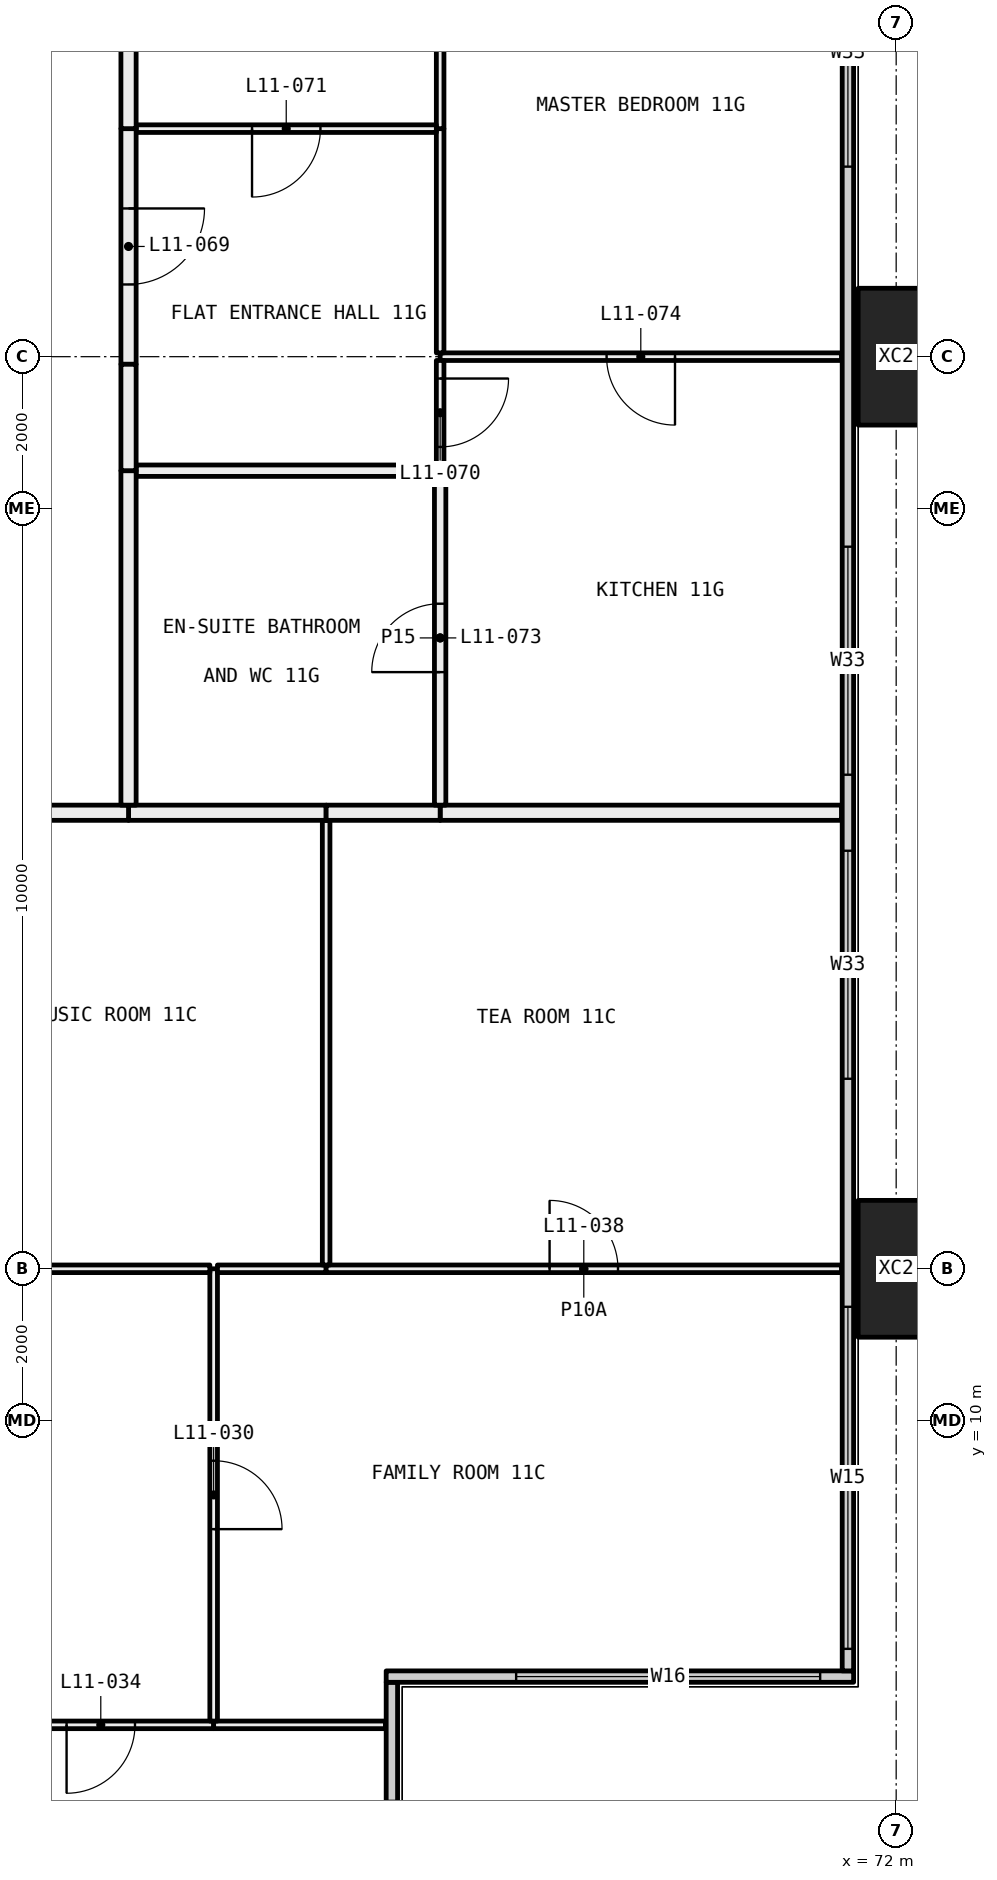
"""IFC4 building model, lengths in metres.
Left out: names, types, materials, properties, quantities, classifications, styles, units other than length and angle.
Written with IfcOpenShell. Run it as: python <this file> out.ifc"""

import sys

from ifc_helpers import new_model, si_unit, direction, frame, frame_2d, origin, origin_2d, place, context, subcontext, project, spatial, rectangle, hollow_rectangle, extrude, element, fill, save


model = new_model("IFC4")
c1 = context("Model", 3, precision=1e-05, world=origin(), true_north=direction((0.0, 1.0)))
c2 = subcontext(c1, "Body", "Model", "MODEL_VIEW")
j1 = project(units=[si_unit("LENGTHUNIT", "METRE"), si_unit("PLANEANGLEUNIT", "RADIAN")], contexts=[c1])
p1 = place(None, origin())
s1 = spatial("IfcSite", under=j1, at=p1, CompositionType="ELEMENT")
p2 = place(p1, origin())
s2 = spatial("IfcBuilding", under=s1, at=p2, CompositionType="ELEMENT")
p3 = place(p2, frame((0.0, 0.0, 50.7)))
s3 = spatial("IfcBuildingStorey", under=s2, at=p3, CompositionType="ELEMENT", Elevation=50.7)
for number, where, z_axis, x_axis in (
    (1, (72.0, 12.0, -0.4), (0.0, 0.0, 1.0), (0.0, 1.0, 0.0)),
    (2, (72.0, 24.0, -0.4), (0.0, 0.0, 1.0), (0.0, 1.0, 0.0)),
):
    element("IfcColumn", number, at=place(p3, frame(where, z_axis=z_axis, x_axis=x_axis)), inside=s3, PredefinedType="COLUMN", context=c2, shape_type="SweptSolid", body=[
        extrude(hollow_rectangle(XDim=1.8, YDim=1.0, WallThickness=0.07, at=origin_2d()), origin(), (0.0, 0.0, 1.0), 3.45),
    ])
p4 = place(p3, frame((65.365, 0.71, 0.0), z_axis=(0.0, 0.0, 1.0), x_axis=(0.0, 1.0, 0.0)))
e3 = element("IfcWall", 3, at=p4, inside=s3, PredefinedType="ELEMENTEDWALL", context=c2, shape_type="SweptSolid", body=[
    extrude(rectangle(XDim=5.85, YDim=0.15, at=frame_2d((2.925, 0.0))), origin(), (0.0, 0.0, 1.0), 3.05),
])
p5 = place(p4, frame((0.29, 0.0, 0.45)))
e4 = element("IfcOpeningElement", 4, at=p5, cuts=e3, PredefinedType="OPENING", context=c2, shape_type="SweptSolid", body=[
    extrude(rectangle(XDim=4.0, YDim=2.55, at=frame_2d((2.0, 1.275))), frame((0.0, 0.085, 0.0), z_axis=(0.0, -1.0, 0.0), x_axis=(1.0, 0.0, 0.0)), (0.0, 0.0, 1.0), 0.17),
])
p6 = place(p3, frame((65.29, 6.635, 0.0), z_axis=(0.0, 0.0, 1.0), x_axis=(1.0, 0.0, 0.0)))
e5 = element("IfcWall", 5, at=p6, inside=s3, PredefinedType="ELEMENTEDWALL", context=c2, shape_type="SweptSolid", body=[
    extrude(rectangle(XDim=6.15, YDim=0.15, at=frame_2d((3.075, 0.0))), origin(), (0.0, 0.0, 1.0), 3.05),
])
p7 = place(p6, frame((1.71, 0.0, 0.45)))
e6 = element("IfcOpeningElement", 6, at=p7, cuts=e5, PredefinedType="OPENING", context=c2, shape_type="SweptSolid", body=[
    extrude(rectangle(XDim=4.0, YDim=2.55, at=frame_2d((2.0, 1.275))), frame((0.0, 0.085, 0.0), z_axis=(0.0, -1.0, 0.0), x_axis=(1.0, 0.0, 0.0)), (0.0, 0.0, 1.0), 0.17),
])
p8 = place(p3, frame((71.365, 6.71, 0.0), z_axis=(0.0, 0.0, 1.0), x_axis=(0.0, 1.0, 0.0)))
e7 = element("IfcWall", 7, at=p8, inside=s3, PredefinedType="ELEMENTEDWALL", context=c2, shape_type="SweptSolid", body=[
    extrude(rectangle(XDim=34.58, YDim=0.15, at=frame_2d((17.29, 0.0))), origin(), (0.0, 0.0, 1.0), 3.05),
])
p9 = place(p8, frame((0.29, 0.0, 0.45)))
e8 = element("IfcOpeningElement", 8, at=p9, cuts=e7, PredefinedType="OPENING", context=c2, shape_type="SweptSolid", body=[
    extrude(rectangle(XDim=4.5, YDim=2.55, at=frame_2d((2.25, 1.275))), frame((0.0, 0.085, 0.0), z_axis=(0.0, -1.0, 0.0), x_axis=(1.0, 0.0, 0.0)), (0.0, 0.0, 1.0), 0.17),
])
p10 = place(p8, frame((7.79, 0.0, 0.45)))
e9 = element("IfcOpeningElement", 9, at=p10, cuts=e7, PredefinedType="OPENING", context=c2, shape_type="SweptSolid", body=[
    extrude(rectangle(XDim=3.0, YDim=2.55, at=frame_2d((1.5, 1.275))), frame((0.0, 0.085, 0.0), z_axis=(0.0, -1.0, 0.0), x_axis=(1.0, 0.0, 0.0)), (0.0, 0.0, 1.0), 0.17),
])
p11 = place(p8, frame((11.79, 0.0, 0.45)))
e10 = element("IfcOpeningElement", 10, at=p11, cuts=e7, PredefinedType="OPENING", context=c2, shape_type="SweptSolid", body=[
    extrude(rectangle(XDim=3.0, YDim=2.55, at=frame_2d((1.5, 1.275))), frame((0.0, 0.085, 0.0), z_axis=(0.0, -1.0, 0.0), x_axis=(1.0, 0.0, 0.0)), (0.0, 0.0, 1.0), 0.17),
])
p12 = place(p8, frame((19.79, 0.0, 0.45)))
e11 = element("IfcOpeningElement", 11, at=p12, cuts=e7, PredefinedType="OPENING", context=c2, shape_type="SweptSolid", body=[
    extrude(rectangle(XDim=3.0, YDim=2.55, at=frame_2d((1.5, 1.275))), frame((0.0, 0.085, 0.0), z_axis=(0.0, -1.0, 0.0), x_axis=(1.0, 0.0, 0.0)), (0.0, 0.0, 1.0), 0.17),
])
p13 = place(p8, frame((23.79, 0.0, 0.45)))
e12 = element("IfcOpeningElement", 12, at=p13, cuts=e7, PredefinedType="OPENING", context=c2, shape_type="SweptSolid", body=[
    extrude(rectangle(XDim=2.0, YDim=2.55, at=frame_2d((1.0, 1.275))), frame((0.0, 0.085, 0.0), z_axis=(0.0, -1.0, 0.0), x_axis=(1.0, 0.0, 0.0)), (0.0, 0.0, 1.0), 0.17),
])
p14 = place(p8, frame((29.79, 0.0, 0.45)))
e13 = element("IfcOpeningElement", 13, at=p14, cuts=e7, PredefinedType="OPENING", context=c2, shape_type="SweptSolid", body=[
    extrude(rectangle(XDim=4.5, YDim=2.55, at=frame_2d((2.25, 1.275))), frame((0.0, 0.085, 0.0), z_axis=(0.0, -1.0, 0.0), x_axis=(1.0, 0.0, 0.0)), (0.0, 0.0, 1.0), 0.17),
])
p15 = place(p3, frame((63.02, 6.0, 0.0), z_axis=(0.0, 0.0, 1.0), x_axis=(-1.0, 0.0, 0.0)))
e14 = element("IfcWall", 14, at=p15, inside=s3, PredefinedType="PARTITIONING", context=c2, shape_type="SweptSolid", body=[
    extrude(rectangle(XDim=2.97, YDim=0.1, at=frame_2d((1.485, 0.0))), origin(), (0.0, 0.0, 1.0), 2.45),
])
p16 = place(p15, frame((1.035, 0.0, 0.0)))
e15 = element("IfcOpeningElement", 15, at=p16, cuts=e14, PredefinedType="OPENING", context=c2, shape_type="SweptSolid", body=[
    extrude(rectangle(XDim=0.9, YDim=2.1, at=frame_2d((0.45, 1.05))), frame((0.0, 0.06, 0.0), z_axis=(0.0, -1.0, 0.0), x_axis=(1.0, 0.0, 0.0)), (0.0, 0.0, 1.0), 0.12),
])
p17 = place(p3, frame((65.28, 6.0, 0.0), z_axis=(0.0, 0.0, 1.0), x_axis=(-1.0, 0.0, 0.0)))
e16 = element("IfcWall", 16, at=p17, inside=s3, PredefinedType="PARTITIONING", context=c2, shape_type="SweptSolid", body=[
    extrude(rectangle(XDim=2.26, YDim=0.1, at=frame_2d((1.13, 0.0))), origin(), (0.0, 0.0, 1.0), 3.05),
])
p18 = place(p3, frame((63.02, 6.05, 0.0), z_axis=(0.0, 0.0, 1.0), x_axis=(0.0, 1.0, 0.0)))
e17 = element("IfcWall", 17, at=p18, inside=s3, PredefinedType="PARTITIONING", context=c2, shape_type="SweptSolid", body=[
    extrude(rectangle(XDim=5.95, YDim=0.1, at=frame_2d((2.975, 0.0))), origin(), (0.0, 0.0, 1.0), 2.45),
])
p19 = place(p18, frame((2.525, 0.0, 0.0)))
e18 = element("IfcOpeningElement", 18, at=p19, cuts=e17, PredefinedType="OPENING", context=c2, shape_type="SweptSolid", body=[
    extrude(rectangle(XDim=0.9, YDim=2.1, at=frame_2d((0.45, 1.05))), frame((0.0, 0.06, 0.0), z_axis=(0.0, -1.0, 0.0), x_axis=(1.0, 0.0, 0.0)), (0.0, 0.0, 1.0), 0.12),
])
p20 = place(p3, frame((62.97, 12.0, 0.0), z_axis=(0.0, 0.0, 1.0), x_axis=(-1.0, 0.0, 0.0)))
e19 = element("IfcWall", 19, at=p20, inside=s3, PredefinedType="PARTITIONING", context=c2, shape_type="SweptSolid", body=[
    extrude(rectangle(XDim=2.17, YDim=0.1, at=frame_2d((1.085, 0.0))), origin(), (0.0, 0.0, 1.0), 2.45),
])
p21 = place(p3, frame((64.5, 12.0, 0.0), z_axis=(0.0, 0.0, 1.0), x_axis=(-1.0, 0.0, 0.0)))
e20 = element("IfcWall", 20, at=p21, inside=s3, PredefinedType="PARTITIONING", context=c2, shape_type="SweptSolid", body=[
    extrude(rectangle(XDim=1.43, YDim=0.1, at=frame_2d((0.715, 0.0))), origin(), (0.0, 0.0, 1.0), 2.45),
])
p22 = place(p3, frame((71.28, 12.0, 0.0), z_axis=(0.0, 0.0, 1.0), x_axis=(-1.0, 0.0, 0.0)))
e21 = element("IfcWall", 21, at=p22, inside=s3, PredefinedType="PARTITIONING", context=c2, shape_type="SweptSolid", body=[
    extrude(rectangle(XDim=6.78, YDim=0.1, at=frame_2d((3.39, 0.0))), origin(), (0.0, 0.0, 1.0), 2.45),
])
p23 = place(p22, frame((2.94, 0.0, 0.0)))
e22 = element("IfcOpeningElement", 22, at=p23, cuts=e21, PredefinedType="OPENING", context=c2, shape_type="SweptSolid", body=[
    extrude(rectangle(XDim=0.9, YDim=2.1, at=frame_2d((0.45, 1.05))), frame((0.0, 0.06, 0.0), z_axis=(0.0, -1.0, 0.0), x_axis=(1.0, 0.0, 0.0)), (0.0, 0.0, 1.0), 0.12),
])
p24 = place(p3, frame((64.5, 12.05, 0.0), z_axis=(0.0, 0.0, 1.0), x_axis=(0.0, 1.0, 0.0)))
e23 = element("IfcWall", 23, at=p24, inside=s3, PredefinedType="PARTITIONING", context=c2, shape_type="SweptSolid", body=[
    extrude(rectangle(XDim=5.85, YDim=0.1, at=frame_2d((2.925, 0.0))), origin(), (0.0, 0.0, 1.0), 2.45),
])
p25 = place(p3, frame((64.5, 18.0, 0.0), z_axis=(0.0, 0.0, 1.0), x_axis=(-1.0, 0.0, 0.0)))
e24 = element("IfcWall", 24, at=p25, inside=s3, PredefinedType="PARTITIONING", context=c2, shape_type="SweptSolid", body=[
    extrude(rectangle(XDim=2.6, YDim=0.2, at=frame_2d((1.3, 0.0))), origin(), (0.0, 0.0, 1.0), 3.05),
])
p26 = place(p3, frame((61.9, 18.0, 0.0), z_axis=(0.0, 0.0, 1.0), x_axis=(-1.0, 0.0, 0.0)))
e25 = element("IfcWall", 25, at=p26, inside=s3, PredefinedType="PARTITIONING", context=c2, shape_type="SweptSolid", body=[
    extrude(rectangle(XDim=4.9, YDim=0.2, at=frame_2d((2.45, 0.0))), origin(), (0.0, 0.0, 1.0), 3.05),
])
p27 = place(p3, frame((71.28, 18.0, 0.0), z_axis=(0.0, 0.0, 1.0), x_axis=(-1.0, 0.0, 0.0)))
e26 = element("IfcWall", 26, at=p27, inside=s3, PredefinedType="PARTITIONING", context=c2, shape_type="SweptSolid", body=[
    extrude(rectangle(XDim=5.28, YDim=0.2, at=frame_2d((2.64, 0.0))), origin(), (0.0, 0.0, 1.0), 3.05),
])
p28 = place(p3, frame((66.0, 18.0, 0.0), z_axis=(0.0, 0.0, 1.0), x_axis=(-1.0, 0.0, 0.0)))
e27 = element("IfcWall", 27, at=p28, inside=s3, PredefinedType="PARTITIONING", context=c2, shape_type="SweptSolid", body=[
    extrude(rectangle(XDim=1.5, YDim=0.2, at=frame_2d((0.75, 0.0))), origin(), (0.0, 0.0, 1.0), 3.05),
])
p29 = place(p3, frame((71.28, 24.0, 0.0), z_axis=(0.0, 0.0, 1.0), x_axis=(-1.0, 0.0, 0.0)))
e28 = element("IfcWall", 28, at=p29, inside=s3, PredefinedType="PARTITIONING", context=c2, shape_type="SweptSolid", body=[
    extrude(rectangle(XDim=5.28, YDim=0.1, at=frame_2d((2.64, 0.0))), origin(), (0.0, 0.0, 1.0), 2.45),
])
p30 = place(p29, frame((2.19, 0.0, 0.0)))
e29 = element("IfcOpeningElement", 29, at=p30, cuts=e28, PredefinedType="OPENING", context=c2, shape_type="SweptSolid", body=[
    extrude(rectangle(XDim=0.9, YDim=2.1, at=frame_2d((0.45, 1.05))), frame((0.0, 0.06, 0.0), z_axis=(0.0, -1.0, 0.0), x_axis=(1.0, 0.0, 0.0)), (0.0, 0.0, 1.0), 0.12),
])
p31 = place(p3, frame((66.0, 22.5, 0.0), z_axis=(0.0, 0.0, 1.0), x_axis=(0.0, -1.0, 0.0)))
e30 = element("IfcWall", 30, at=p31, inside=s3, PredefinedType="PARTITIONING", context=c2, shape_type="SweptSolid", body=[
    extrude(rectangle(XDim=4.4, YDim=0.15, at=frame_2d((2.2, 0.0))), origin(), (0.0, 0.0, 1.0), 3.05),
])
p32 = place(p31, frame((1.75, 0.0, 0.0)))
e31 = element("IfcOpeningElement", 31, at=p32, cuts=e30, PredefinedType="OPENING", context=c2, shape_type="SweptSolid", body=[
    extrude(rectangle(XDim=0.9, YDim=2.1, at=frame_2d((0.45, 1.05))), frame((0.0, 0.085, 0.0), z_axis=(0.0, -1.0, 0.0), x_axis=(1.0, 0.0, 0.0)), (0.0, 0.0, 1.0), 0.17),
])
p33 = place(p3, frame((66.0, 23.95, 0.0), z_axis=(0.0, 0.0, 1.0), x_axis=(0.0, -1.0, 0.0)))
e32 = element("IfcWall", 32, at=p33, inside=s3, PredefinedType="PARTITIONING", context=c2, shape_type="SweptSolid", body=[
    extrude(rectangle(XDim=1.375, YDim=0.1, at=frame_2d((0.688, 0.0))), origin(), (0.0, 0.0, 1.0), 2.45),
])
p34 = place(p33, frame((0.238, 0.0, 0.0)))
e33 = element("IfcOpeningElement", 33, at=p34, cuts=e32, PredefinedType="OPENING", context=c2, shape_type="SweptSolid", body=[
    extrude(rectangle(XDim=0.9, YDim=2.1, at=frame_2d((0.45, 1.05))), frame((0.0, 0.06, 0.0), z_axis=(0.0, -1.0, 0.0), x_axis=(1.0, 0.0, 0.0)), (0.0, 0.0, 1.0), 0.12),
])
p35 = place(p3, frame((66.0, 27.0, 0.0), z_axis=(0.0, 0.0, 1.0), x_axis=(0.0, -1.0, 0.0)))
e34 = element("IfcWall", 34, at=p35, inside=s3, PredefinedType="PARTITIONING", context=c2, shape_type="SweptSolid", body=[
    extrude(rectangle(XDim=2.95, YDim=0.1, at=frame_2d((1.475, 0.0))), origin(), (0.0, 0.0, 1.0), 2.45),
])
p36 = place(p3, frame((66.0, 29.95, 0.0), z_axis=(0.0, 0.0, 1.0), x_axis=(0.0, -1.0, 0.0)))
e35 = element("IfcWall", 35, at=p36, inside=s3, PredefinedType="PARTITIONING", context=c2, shape_type="SweptSolid", body=[
    extrude(rectangle(XDim=2.95, YDim=0.1, at=frame_2d((1.475, 0.0))), origin(), (0.0, 0.0, 1.0), 3.05),
])
p37 = place(p3, frame((65.925, 22.5, 0.0), z_axis=(0.0, 0.0, 1.0), x_axis=(-1.0, 0.0, 0.0)))
e36 = element("IfcWall", 36, at=p37, inside=s3, PredefinedType="PARTITIONING", context=c2, shape_type="SweptSolid", body=[
    extrude(rectangle(XDim=3.925, YDim=0.15, at=frame_2d((1.962, 0.0))), origin(), (0.0, 0.0, 1.0), 3.05),
])
p38 = place(p3, frame((61.9, 22.5, 0.0), z_axis=(0.0, 0.0, 1.0), x_axis=(0.0, -1.0, 0.0)))
e37 = element("IfcWall", 37, at=p38, inside=s3, PredefinedType="PARTITIONING", context=c2, shape_type="SweptSolid", body=[
    extrude(rectangle(XDim=4.4, YDim=0.2, at=frame_2d((2.2, 0.0))), origin(), (0.0, 0.0, 1.0), 3.05),
])
p39 = place(p3, frame((65.95, 27.0, 0.0), z_axis=(0.0, 0.0, 1.0), x_axis=(-1.0, 0.0, 0.0)))
e38 = element("IfcWall", 38, at=p39, inside=s3, PredefinedType="PARTITIONING", context=c2, shape_type="SweptSolid", body=[
    extrude(rectangle(XDim=3.95, YDim=0.1, at=frame_2d((1.975, 0.0))), origin(), (0.0, 0.0, 1.0), 3.05),
])
p40 = place(p39, frame((1.525, 0.0, 0.0)))
e39 = element("IfcOpeningElement", 39, at=p40, cuts=e38, PredefinedType="OPENING", context=c2, shape_type="SweptSolid", body=[
    extrude(rectangle(XDim=0.9, YDim=2.1, at=frame_2d((0.45, 1.05))), frame((0.0, 0.06, 0.0), z_axis=(0.0, -1.0, 0.0), x_axis=(1.0, 0.0, 0.0)), (0.0, 0.0, 1.0), 0.12),
])
p41 = place(p3, frame((61.9, 27.0, 0.0), z_axis=(0.0, 0.0, 1.0), x_axis=(0.0, -1.0, 0.0)))
e40 = element("IfcWall", 40, at=p41, inside=s3, PredefinedType="PARTITIONING", context=c2, shape_type="SweptSolid", body=[
    extrude(rectangle(XDim=3.1, YDim=0.2, at=frame_2d((1.55, 0.0))), origin(), (0.0, 0.0, 1.0), 2.45),
])
p42 = place(p41, frame((1.05, 0.0, 0.0)))
e41 = element("IfcOpeningElement", 41, at=p42, cuts=e40, PredefinedType="OPENING", context=c2, shape_type="SweptSolid", body=[
    extrude(rectangle(XDim=1.0, YDim=2.1, at=frame_2d((0.5, 1.05))), frame((0.0, 0.11, 0.0), z_axis=(0.0, -1.0, 0.0), x_axis=(1.0, 0.0, 0.0)), (0.0, 0.0, 1.0), 0.22),
])
p43 = place(p3, frame((61.9, 23.9, 0.0), z_axis=(0.0, 0.0, 1.0), x_axis=(0.0, -1.0, 0.0)))
e42 = element("IfcWall", 42, at=p43, inside=s3, PredefinedType="PARTITIONING", context=c2, shape_type="SweptSolid", body=[
    extrude(rectangle(XDim=1.4, YDim=0.2, at=frame_2d((0.7, 0.0))), origin(), (0.0, 0.0, 1.0), 3.05),
])
p44 = place(p3, frame((61.9, 35.9, 0.0), z_axis=(0.0, 0.0, 1.0), x_axis=(0.0, -1.0, 0.0)))
e43 = element("IfcWall", 43, at=p44, inside=s3, PredefinedType="PARTITIONING", context=c2, shape_type="SweptSolid", body=[
    extrude(rectangle(XDim=8.9, YDim=0.2, at=frame_2d((4.45, 0.0))), origin(), (0.0, 0.0, 1.0), 3.05),
])
p45 = place(p7, origin())
e44 = element("IfcWindow", 44, at=p45, inside=s3, PartitioningType="SINGLE_PANEL", PredefinedType="WINDOW", context=c2, shape_type="SweptSolid", body=[
    extrude(rectangle(XDim=4.0, YDim=2.55, at=frame_2d((2.0, 1.275))), frame((0.0, 0.03, 0.0), z_axis=(0.0, -1.0, 0.0), x_axis=(1.0, 0.0, 0.0)), (0.0, 0.0, 1.0), 0.06),
])
fill(e6, e44)
p46 = place(p9, origin())
e45 = element("IfcWindow", 45, at=p46, inside=s3, PartitioningType="SINGLE_PANEL", PredefinedType="WINDOW", context=c2, shape_type="SweptSolid", body=[
    extrude(rectangle(XDim=4.5, YDim=2.55, at=frame_2d((2.25, 1.275))), frame((0.0, 0.03, 0.0), z_axis=(0.0, -1.0, 0.0), x_axis=(1.0, 0.0, 0.0)), (0.0, 0.0, 1.0), 0.06),
])
fill(e8, e45)
p47 = place(p10, origin())
e46 = element("IfcWindow", 46, at=p47, inside=s3, PartitioningType="SINGLE_PANEL", PredefinedType="WINDOW", context=c2, shape_type="SweptSolid", body=[
    extrude(rectangle(XDim=3.0, YDim=2.55, at=frame_2d((1.5, 1.275))), frame((0.0, 0.03, 0.0), z_axis=(0.0, -1.0, 0.0), x_axis=(1.0, 0.0, 0.0)), (0.0, 0.0, 1.0), 0.06),
])
fill(e9, e46)
p48 = place(p11, origin())
e47 = element("IfcWindow", 47, at=p48, inside=s3, PartitioningType="SINGLE_PANEL", PredefinedType="WINDOW", context=c2, shape_type="SweptSolid", body=[
    extrude(rectangle(XDim=3.0, YDim=2.55, at=frame_2d((1.5, 1.275))), frame((0.0, 0.03, 0.0), z_axis=(0.0, -1.0, 0.0), x_axis=(1.0, 0.0, 0.0)), (0.0, 0.0, 1.0), 0.06),
])
fill(e10, e47)
p49 = place(p12, origin())
e48 = element("IfcWindow", 48, at=p49, inside=s3, PartitioningType="SINGLE_PANEL", PredefinedType="WINDOW", context=c2, shape_type="SweptSolid", body=[
    extrude(rectangle(XDim=3.0, YDim=2.55, at=frame_2d((1.5, 1.275))), frame((0.0, 0.03, 0.0), z_axis=(0.0, -1.0, 0.0), x_axis=(1.0, 0.0, 0.0)), (0.0, 0.0, 1.0), 0.06),
])
fill(e11, e48)
p50 = place(p19, frame((0.9, 0.0, 0.0), x_axis=(-1.0, 0.0, 0.0)))
e49 = element("IfcDoor", 49, at=p50, inside=s3, OperationType="SINGLE_SWING_LEFT", PredefinedType="DOOR", context=c2, shape_type="SweptSolid", body=[
    extrude(rectangle(XDim=0.9, YDim=2.1, at=frame_2d((0.45, 1.05))), frame((0.0, 0.025, 0.0), z_axis=(0.0, -1.0, 0.0), x_axis=(1.0, 0.0, 0.0)), (0.0, 0.0, 1.0), 0.05),
])
fill(e18, e49)
p51 = place(p16, origin())
e50 = element("IfcDoor", 50, at=p51, inside=s3, OperationType="SINGLE_SWING_LEFT", PredefinedType="DOOR", context=c2, shape_type="SweptSolid", body=[
    extrude(rectangle(XDim=0.9, YDim=2.1, at=frame_2d((0.45, 1.05))), frame((0.0, 0.025, 0.0), z_axis=(0.0, -1.0, 0.0), x_axis=(1.0, 0.0, 0.0)), (0.0, 0.0, 1.0), 0.05),
])
fill(e15, e50)
p52 = place(p23, frame((0.9, 0.0, 0.0), x_axis=(-1.0, 0.0, 0.0)))
e51 = element("IfcDoor", 51, at=p52, inside=s3, OperationType="SINGLE_SWING_RIGHT", PredefinedType="DOOR", context=c2, shape_type="SweptSolid", body=[
    extrude(rectangle(XDim=0.9, YDim=2.1, at=frame_2d((0.45, 1.05))), frame((0.0, 0.025, 0.0), z_axis=(0.0, -1.0, 0.0), x_axis=(1.0, 0.0, 0.0)), (0.0, 0.0, 1.0), 0.05),
])
fill(e22, e51)
p53 = place(p42, origin())
e52 = element("IfcDoor", 52, at=p53, inside=s3, OperationType="SINGLE_SWING_RIGHT", PredefinedType="DOOR", context=c2, shape_type="SweptSolid", body=[
    extrude(rectangle(XDim=1.0, YDim=2.1, at=frame_2d((0.5, 1.05))), frame((0.0, 0.025, 0.0), z_axis=(0.0, -1.0, 0.0), x_axis=(1.0, 0.0, 0.0)), (0.0, 0.0, 1.0), 0.05),
])
fill(e41, e52)
p54 = place(p34, origin())
e53 = element("IfcDoor", 53, at=p54, inside=s3, OperationType="SINGLE_SWING_RIGHT", PredefinedType="DOOR", context=c2, shape_type="SweptSolid", body=[
    extrude(rectangle(XDim=0.9, YDim=2.1, at=frame_2d((0.45, 1.05))), frame((0.0, 0.025, 0.0), z_axis=(0.0, -1.0, 0.0), x_axis=(1.0, 0.0, 0.0)), (0.0, 0.0, 1.0), 0.05),
])
fill(e33, e53)
p55 = place(p40, origin())
e54 = element("IfcDoor", 54, at=p55, inside=s3, OperationType="SINGLE_SWING_LEFT", PredefinedType="DOOR", context=c2, shape_type="SweptSolid", body=[
    extrude(rectangle(XDim=0.9, YDim=2.1, at=frame_2d((0.45, 1.05))), frame((0.0, 0.025, 0.0), z_axis=(0.0, -1.0, 0.0), x_axis=(1.0, 0.0, 0.0)), (0.0, 0.0, 1.0), 0.05),
])
fill(e39, e54)
p56 = place(p32, frame((0.9, 0.0, 0.0), x_axis=(-1.0, 0.0, 0.0)))
e55 = element("IfcDoor", 55, at=p56, inside=s3, OperationType="SINGLE_SWING_RIGHT", PredefinedType="DOOR", context=c2, shape_type="SweptSolid", body=[
    extrude(rectangle(XDim=0.9, YDim=2.1, at=frame_2d((0.45, 1.05))), frame((0.0, 0.025, 0.0), z_axis=(0.0, -1.0, 0.0), x_axis=(1.0, 0.0, 0.0)), (0.0, 0.0, 1.0), 0.05),
])
fill(e31, e55)
p57 = place(p30, origin())
e56 = element("IfcDoor", 56, at=p57, inside=s3, OperationType="SINGLE_SWING_RIGHT", PredefinedType="DOOR", context=c2, shape_type="SweptSolid", body=[
    extrude(rectangle(XDim=0.9, YDim=2.1, at=frame_2d((0.45, 1.05))), frame((0.0, 0.025, 0.0), z_axis=(0.0, -1.0, 0.0), x_axis=(1.0, 0.0, 0.0)), (0.0, 0.0, 1.0), 0.05),
])
fill(e29, e56)
save(model, sys.argv[1])
